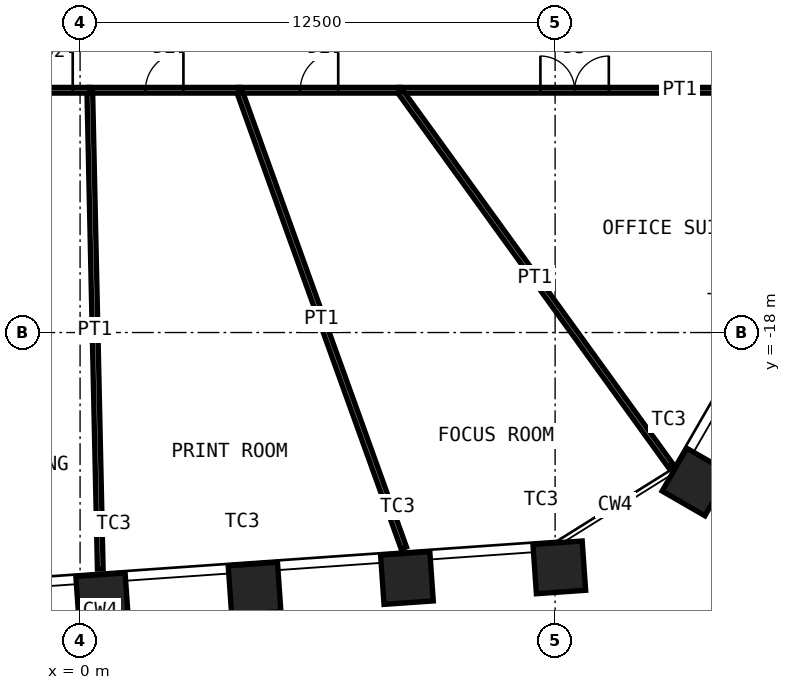
"""IFC4 building model, lengths in metres.
Left out: names, types, materials, properties, quantities, classifications, styles, units other than length and angle.
Written with IfcOpenShell. Run it as: python <this file> out.ifc"""

import sys

from ifc_helpers import new_model, si_unit, direction, frame, frame_2d, origin, origin_2d, place, context, subcontext, project, spatial, rectangle, hollow_rectangle, extrude, element, fill, save


model = new_model("IFC4")
c1 = context("Model", 3, precision=1e-05, world=origin(), true_north=direction((0.0, 1.0)))
c2 = subcontext(c1, "Body", "Model", "MODEL_VIEW")
j1 = project(units=[si_unit("LENGTHUNIT", "METRE"), si_unit("PLANEANGLEUNIT", "RADIAN")], contexts=[c1])
p1 = place(None, origin())
s1 = spatial("IfcSite", under=j1, at=p1, CompositionType="ELEMENT")
p2 = place(p1, origin())
s2 = spatial("IfcBuilding", under=s1, at=p2, CompositionType="ELEMENT")
p3 = place(p2, frame((0.0, 0.0, 111.4)))
s3 = spatial("IfcBuildingStorey", under=s2, at=p3, CompositionType="ELEMENT", Elevation=111.4)
for number, where, z_axis, x_axis in (
    (1, (16.204, -21.933, 0.0), (0.0, 0.0, 1.0), (0.5, 0.866, 0.0)),
    (2, (12.61, -24.179, 0.0), (0.0, 0.0, 1.0), (0.998, 0.07, 0.0)),
    (3, (8.601, -24.46, 0.0), (0.0, 0.0, 1.0), (0.998, 0.07, 0.0)),
    (4, (4.592, -24.74, 0.0), (0.0, 0.0, 1.0), (0.998, 0.07, 0.0)),
    (5, (0.582, -25.02, 0.0), (0.0, 0.0, 1.0), (0.998, 0.07, 0.0)),
):
    element("IfcColumn", number, at=place(p3, frame(where, z_axis=z_axis, x_axis=x_axis)), inside=s3, PredefinedType="COLUMN", context=c2, shape_type="SweptSolid", body=[
        extrude(hollow_rectangle(XDim=1.3, YDim=1.3, WallThickness=0.1, at=origin_2d()), origin(), (0.0, 0.0, 1.0), 4.2),
    ])
p4 = place(p3, frame((17.625, -11.625, 0.0), z_axis=(0.0, 0.0, 1.0), x_axis=(-1.0, 0.0, 0.0)))
e6 = element("IfcWall", 6, at=p4, inside=s3, PredefinedType="PARTITIONING", context=c2, shape_type="SweptSolid", body=[
    extrude(rectangle(XDim=9.224, YDim=0.15, at=frame_2d((4.612, 0.0))), origin(), (0.0, 0.0, 1.0), 4.03),
])
p5 = place(p4, frame((3.712, 0.0, 0.0)))
e7 = element("IfcOpeningElement", 7, at=p5, cuts=e6, PredefinedType="OPENING", context=c2, shape_type="SweptSolid", body=[
    extrude(rectangle(XDim=1.8, YDim=2.4, at=frame_2d((0.9, 1.2))), frame((0.0, 0.085, 0.0), z_axis=(0.0, -1.0, 0.0), x_axis=(1.0, 0.0, 0.0)), (0.0, 0.0, 1.0), 0.17),
])
p6 = place(p3, frame((15.54, -21.502, 0.0), z_axis=(0.0, 0.0, 1.0), x_axis=(-0.585731902034, 0.810504866697, 0.0)))
e8 = element("IfcWall", 8, at=p6, inside=s3, PredefinedType="PARTITIONING", context=c2, shape_type="SweptSolid", body=[
    extrude(rectangle(XDim=12.187, YDim=0.15, at=frame_2d((6.093, 0.0))), origin(), (0.0, 0.0, 1.0), 2.93),
])
p7 = place(p3, frame((8.401, -11.625, 0.0), z_axis=(0.0, 0.0, 1.0), x_axis=(-1.0, 0.0, 0.0)))
e9 = element("IfcWall", 9, at=p7, inside=s3, PredefinedType="PARTITIONING", context=c2, shape_type="SweptSolid", body=[
    extrude(rectangle(XDim=4.217, YDim=0.15, at=frame_2d((2.109, 0.0))), origin(), (0.0, 0.0, 1.0), 4.03),
])
p8 = place(p7, frame((1.609, 0.0, 0.0)))
e10 = element("IfcOpeningElement", 10, at=p8, cuts=e9, PredefinedType="OPENING", context=c2, shape_type="SweptSolid", body=[
    extrude(rectangle(XDim=1.0, YDim=2.4, at=frame_2d((0.5, 1.2))), frame((0.0, 0.085, 0.0), z_axis=(0.0, -1.0, 0.0), x_axis=(1.0, 0.0, 0.0)), (0.0, 0.0, 1.0), 0.17),
])
p9 = place(p3, frame((8.518, -23.667, 0.0), z_axis=(0.0, 0.0, 1.0), x_axis=(-0.338635030469, 0.940917805198, 0.0)))
e11 = element("IfcWall", 11, at=p9, inside=s3, PredefinedType="PARTITIONING", context=c2, shape_type="SweptSolid", body=[
    extrude(rectangle(XDim=12.798, YDim=0.15, at=frame_2d((6.399, 0.0))), origin(), (0.0, 0.0, 1.0), 3.33),
])
p10 = place(p3, frame((4.184, -11.625, 0.0), z_axis=(0.0, 0.0, 1.0), x_axis=(-1.0, 0.0, 0.0)))
e12 = element("IfcWall", 12, at=p10, inside=s3, PredefinedType="PARTITIONING", context=c2, shape_type="SweptSolid", body=[
    extrude(rectangle(XDim=3.929, YDim=0.15, at=frame_2d((1.965, 0.0))), origin(), (0.0, 0.0, 1.0), 4.03),
])
p11 = place(p10, frame((1.465, 0.0, 0.0)))
e13 = element("IfcOpeningElement", 13, at=p11, cuts=e12, PredefinedType="OPENING", context=c2, shape_type="SweptSolid", body=[
    extrude(rectangle(XDim=1.0, YDim=2.4, at=frame_2d((0.5, 1.2))), frame((0.0, 0.085, 0.0), z_axis=(0.0, -1.0, 0.0), x_axis=(1.0, 0.0, 0.0)), (0.0, 0.0, 1.0), 0.17),
])
p12 = place(p3, frame((0.531, -24.222, 0.0), z_axis=(0.0, 0.0, 1.0), x_axis=(-0.021933557026, 0.999759430601, 0.0)))
e14 = element("IfcWall", 14, at=p12, inside=s3, PredefinedType="PARTITIONING", context=c2, shape_type="SweptSolid", body=[
    extrude(rectangle(XDim=12.6, YDim=0.15, at=frame_2d((6.3, 0.0))), origin(), (0.0, 0.0, 1.0), 3.33),
])
p13 = place(p3, frame((0.255, -11.625, 0.0), z_axis=(0.0, 0.0, 1.0), x_axis=(-1.0, 0.0, 0.0)))
e15 = element("IfcWall", 15, at=p13, inside=s3, PredefinedType="PARTITIONING", context=c2, shape_type="SweptSolid", body=[
    extrude(rectangle(XDim=1.897, YDim=0.15, at=frame_2d((0.949, 0.0))), origin(), (0.0, 0.0, 1.0), 4.03),
])
p14 = place(p13, frame((0.449, 0.0, 0.0)))
e16 = element("IfcOpeningElement", 16, at=p14, cuts=e15, PredefinedType="OPENING", context=c2, shape_type="SweptSolid", body=[
    extrude(rectangle(XDim=1.0, YDim=2.4, at=frame_2d((0.5, 1.2))), frame((0.0, 0.085, 0.0), z_axis=(0.0, -1.0, 0.0), x_axis=(1.0, 0.0, 0.0)), (0.0, 0.0, 1.0), 0.17),
])
p15 = place(p5, origin())
e17 = element("IfcDoor", 17, at=p15, inside=s3, OperationType="DOUBLE_DOOR_DOUBLE_SWING", PredefinedType="DOOR", context=c2, shape_type="SweptSolid", body=[
    extrude(rectangle(XDim=1.8, YDim=2.4, at=frame_2d((0.9, 1.2))), frame((0.0, 0.025, 0.0), z_axis=(0.0, -1.0, 0.0), x_axis=(1.0, 0.0, 0.0)), (0.0, 0.0, 1.0), 0.05),
])
fill(e7, e17)
p16 = place(p8, origin())
e18 = element("IfcDoor", 18, at=p16, inside=s3, OperationType="SINGLE_SWING_LEFT", PredefinedType="DOOR", context=c2, shape_type="SweptSolid", body=[
    extrude(rectangle(XDim=1.0, YDim=2.4, at=frame_2d((0.5, 1.2))), frame((0.0, 0.025, 0.0), z_axis=(0.0, -1.0, 0.0), x_axis=(1.0, 0.0, 0.0)), (0.0, 0.0, 1.0), 0.05),
])
fill(e10, e18)
p17 = place(p11, origin())
e19 = element("IfcDoor", 19, at=p17, inside=s3, OperationType="SINGLE_SWING_LEFT", PredefinedType="DOOR", context=c2, shape_type="SweptSolid", body=[
    extrude(rectangle(XDim=1.0, YDim=2.4, at=frame_2d((0.5, 1.2))), frame((0.0, 0.025, 0.0), z_axis=(0.0, -1.0, 0.0), x_axis=(1.0, 0.0, 0.0)), (0.0, 0.0, 1.0), 0.05),
])
fill(e13, e19)
p18 = place(p14, origin())
e20 = element("IfcDoor", 20, at=p18, inside=s3, OperationType="SINGLE_SWING_LEFT", PredefinedType="DOOR", context=c2, shape_type="SweptSolid", body=[
    extrude(rectangle(XDim=1.0, YDim=2.4, at=frame_2d((0.5, 1.2))), frame((0.0, 0.025, 0.0), z_axis=(0.0, -1.0, 0.0), x_axis=(1.0, 0.0, 0.0)), (0.0, 0.0, 1.0), 0.05),
])
fill(e16, e20)
save(model, sys.argv[1])
